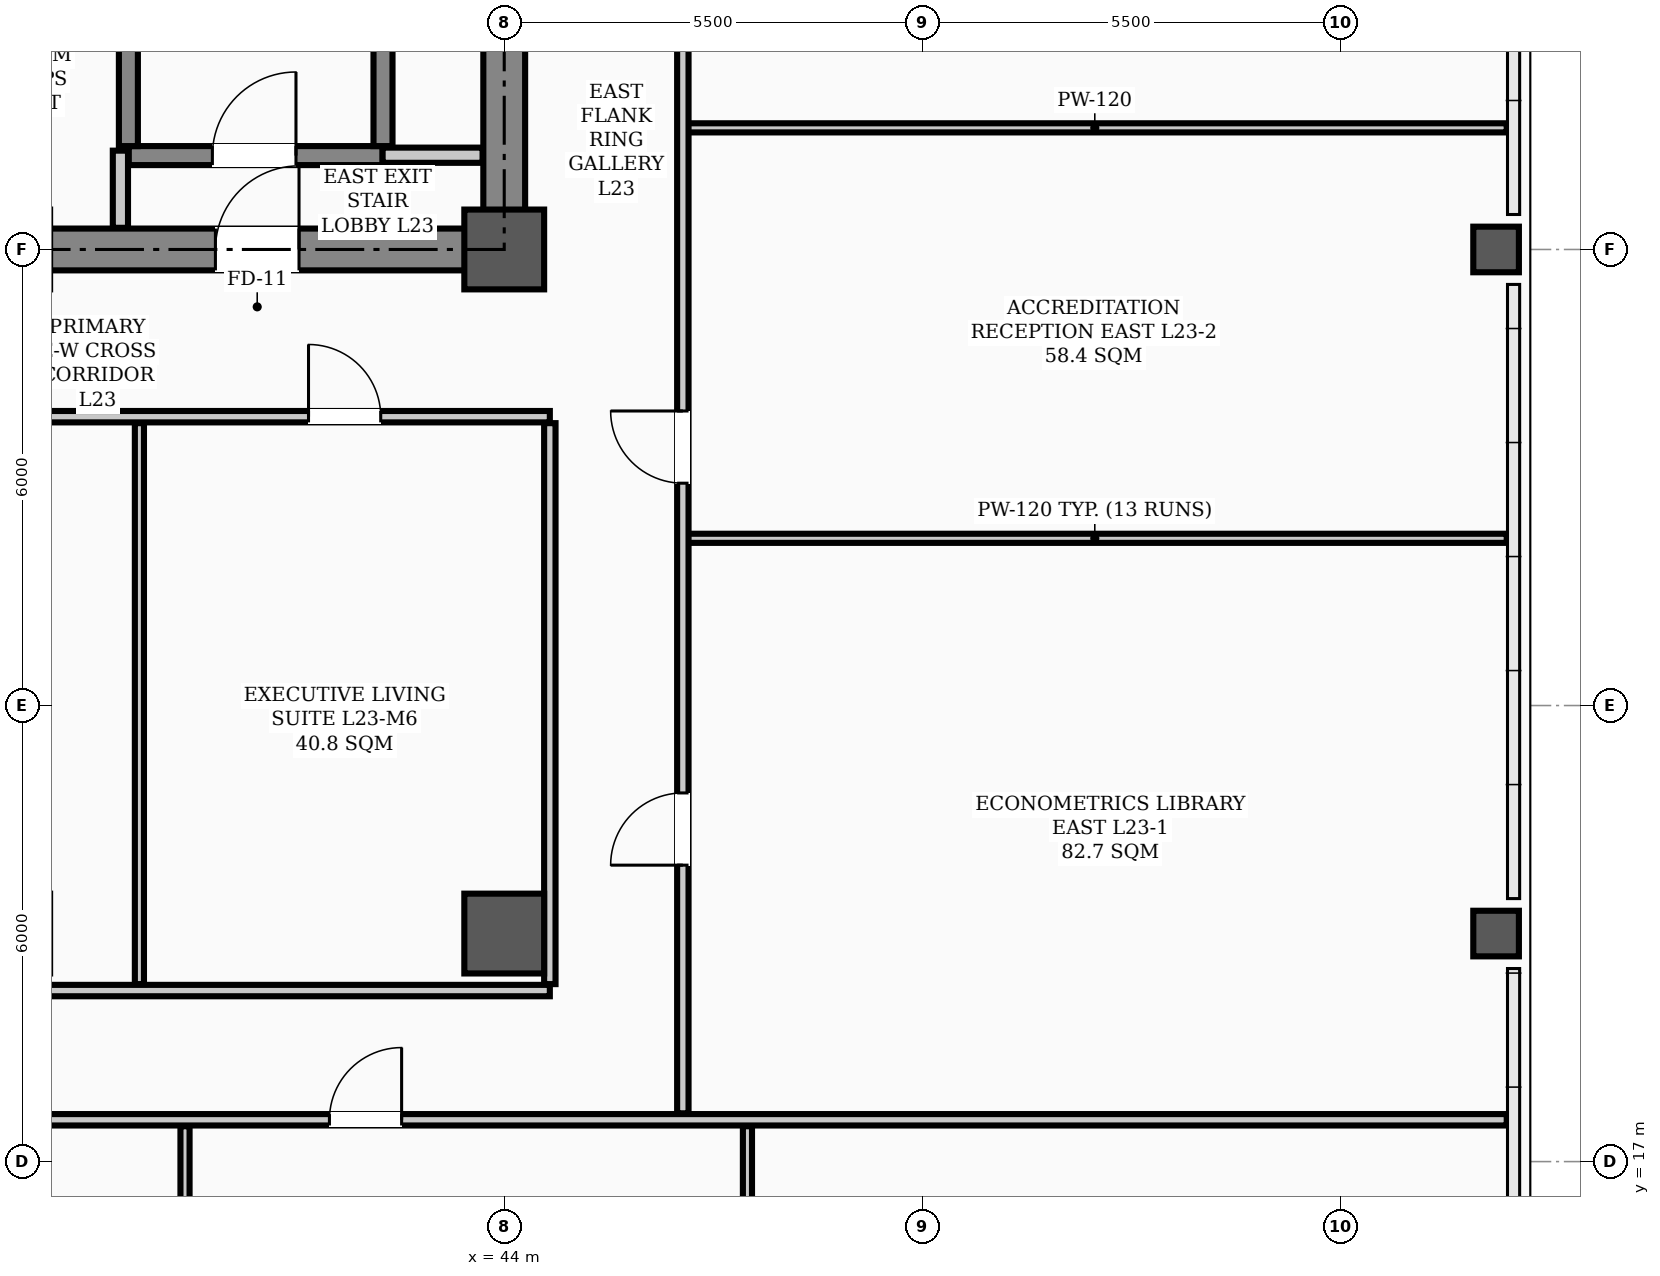
"""IFC4 building model, lengths in metres.
Left out: names, types, materials, properties, quantities, classifications, styles, units other than length and angle.
Written with IfcOpenShell. Run it as: python <this file> out.ifc"""

import sys

from ifc_helpers import new_model, si_unit, direction, frame, frame_2d, origin, origin_2d, place, context, subcontext, project, spatial, rectangle, hollow_rectangle, extrude, element, fill, save


model = new_model("IFC4")
c1 = context("Model", 3, precision=1e-05, world=origin(), true_north=direction((0.0, 1.0)))
c2 = subcontext(c1, "Body", "Model", "MODEL_VIEW")
j1 = project(units=[si_unit("LENGTHUNIT", "METRE"), si_unit("PLANEANGLEUNIT", "RADIAN")], contexts=[c1])
p1 = place(None, origin())
s1 = spatial("IfcSite", under=j1, at=p1, CompositionType="ELEMENT")
p2 = place(p1, origin())
s2 = spatial("IfcBuilding", under=s1, at=p2, CompositionType="ELEMENT")
p3 = place(p2, frame((0.0, 0.0, 92.8)))
s3 = spatial("IfcBuildingStorey", under=s2, at=p3, CompositionType="ELEMENT", Elevation=92.8)
for number, where, z_axis, x_axis in (
    (1, (44.0, 29.0, 0.0), (0.0, 0.0, 1.0), (1.0, 0.0, 0.0)),
    (2, (44.0, 20.0, 0.0), (0.0, 0.0, 1.0), (1.0, 0.0, 0.0)),
):
    element("IfcColumn", number, at=place(p3, frame(where, z_axis=z_axis, x_axis=x_axis)), inside=s3, PredefinedType="COLUMN", context=c2, shape_type="SweptSolid", body=[
        extrude(hollow_rectangle(XDim=1.05, YDim=1.05, WallThickness=0.038, InnerFilletRadius=0.019, OuterFilletRadius=0.057, at=origin_2d()), origin(), (0.0, 0.0, 1.0), 3.9),
    ])
for number, where, z_axis, x_axis in (
    (3, (57.05, 20.0, 0.0), (0.0, 0.0, 1.0), (1.0, 0.0, 0.0)),
    (4, (57.05, 29.0, 0.0), (0.0, 0.0, 1.0), (1.0, 0.0, 0.0)),
):
    element("IfcColumn", number, at=place(p3, frame(where, z_axis=z_axis, x_axis=x_axis)), inside=s3, PredefinedType="COLUMN", context=c2, shape_type="SweptSolid", body=[
        extrude(hollow_rectangle(XDim=0.6, YDim=0.6, WallThickness=0.026, InnerFilletRadius=0.013, OuterFilletRadius=0.039, at=origin_2d()), origin(), (0.0, 0.0, 1.0), 3.9),
    ])
p4 = place(p3, frame((13.5, 29.0, 0.0), z_axis=(0.0, 0.0, 1.0), x_axis=(1.0, 0.0, 0.0)))
e5 = element("IfcWall", 5, at=p4, inside=s3, PredefinedType="SHEAR", context=c2, shape_type="SweptSolid", body=[
    extrude(rectangle(XDim=30.5, YDim=0.55, at=frame_2d((15.25, 0.0))), origin(), (0.0, 0.0, 1.0), 3.72),
])
p5 = place(p4, frame((1.75, 0.0, 0.0)))
e6 = element("IfcOpeningElement", 6, at=p5, cuts=e5, PredefinedType="OPENING", context=c2, shape_type="SweptSolid", body=[
    extrude(rectangle(XDim=1.1, YDim=2.08, at=frame_2d((0.55, 1.04))), frame((0.0, 0.285, 0.0), z_axis=(0.0, -1.0, 0.0), x_axis=(1.0, 0.0, 0.0)), (0.0, 0.0, 1.0), 0.57),
])
p6 = place(p4, frame((26.7, 0.0, 0.0)))
e7 = element("IfcOpeningElement", 7, at=p6, cuts=e5, PredefinedType="OPENING", context=c2, shape_type="SweptSolid", body=[
    extrude(rectangle(XDim=1.1, YDim=2.08, at=frame_2d((0.55, 1.04))), frame((0.0, 0.285, 0.0), z_axis=(0.0, -1.0, 0.0), x_axis=(1.0, 0.0, 0.0)), (0.0, 0.0, 1.0), 0.57),
])
p7 = place(p4, frame((6.8, 0.0, 0.0)))
e8 = element("IfcOpeningElement", 8, at=p7, cuts=e5, PredefinedType="OPENING", context=c2, shape_type="SweptSolid", body=[
    extrude(rectangle(XDim=1.1, YDim=2.08, at=frame_2d((0.55, 1.04))), frame((0.0, 0.285, 0.0), z_axis=(0.0, -1.0, 0.0), x_axis=(1.0, 0.0, 0.0)), (0.0, 0.0, 1.0), 0.57),
])
p8 = place(p4, frame((13.2, 0.0, 0.0)))
e9 = element("IfcOpeningElement", 9, at=p8, cuts=e5, PredefinedType="OPENING", context=c2, shape_type="SweptSolid", body=[
    extrude(rectangle(XDim=1.6, YDim=2.08, at=frame_2d((0.8, 1.04))), frame((0.0, 0.285, 0.0), z_axis=(0.0, -1.0, 0.0), x_axis=(1.0, 0.0, 0.0)), (0.0, 0.0, 1.0), 0.57),
])
p9 = place(p4, frame((19.6, 0.0, 0.0)))
e10 = element("IfcOpeningElement", 10, at=p9, cuts=e5, PredefinedType="OPENING", context=c2, shape_type="SweptSolid", body=[
    extrude(rectangle(XDim=0.9, YDim=2.08, at=frame_2d((0.45, 1.04))), frame((0.0, 0.285, 0.0), z_axis=(0.0, -1.0, 0.0), x_axis=(1.0, 0.0, 0.0)), (0.0, 0.0, 1.0), 0.57),
])
p10 = place(p4, frame((21.6, 0.0, 0.0)))
e11 = element("IfcOpeningElement", 11, at=p10, cuts=e5, PredefinedType="OPENING", context=c2, shape_type="SweptSolid", body=[
    extrude(rectangle(XDim=0.9, YDim=2.08, at=frame_2d((0.45, 1.04))), frame((0.0, 0.285, 0.0), z_axis=(0.0, -1.0, 0.0), x_axis=(1.0, 0.0, 0.0)), (0.0, 0.0, 1.0), 0.57),
])
p11 = place(p3, frame((44.0, 29.35, 0.0), z_axis=(0.0, 0.0, 1.0), x_axis=(0.0, 1.0, 0.0)))
e12 = element("IfcWall", 12, at=p11, inside=s3, PredefinedType="SHEAR", context=c2, shape_type="SweptSolid", body=[
    extrude(rectangle(XDim=8.6, YDim=0.55, at=frame_2d((4.3, 0.0))), origin(), (0.0, 0.0, 1.0), 3.72),
])
p12 = place(p3, frame((39.06, 30.235, 0.0), z_axis=(0.0, 0.0, 1.0), x_axis=(1.0, 0.0, 0.0)))
e13 = element("IfcWall", 13, at=p12, inside=s3, PredefinedType="STANDARD", context=c2, shape_type="SweptSolid", body=[
    extrude(rectangle(XDim=3.34, YDim=0.25, at=frame_2d((1.67, 0.0))), origin(), (0.0, 0.0, 1.0), 3.72),
])
p13 = place(p12, frame((1.1, 0.0, 0.0)))
e14 = element("IfcOpeningElement", 14, at=p13, cuts=e13, PredefinedType="OPENING", context=c2, shape_type="SweptSolid", body=[
    extrude(rectangle(XDim=1.1, YDim=2.08, at=frame_2d((0.55, 1.04))), frame((0.0, 0.135, 0.0), z_axis=(0.0, -1.0, 0.0), x_axis=(1.0, 0.0, 0.0)), (0.0, 0.0, 1.0), 0.27),
])
for number, where, z_axis, x_axis in (
    (15, (39.055, 30.36, 0.0), (0.0, 0.0, 1.0), (0.0, 1.0, 0.0)),
    (16, (42.405, 30.36, 0.0), (0.0, 0.0, 1.0), (0.0, 1.0, 0.0)),
):
    element("IfcWall", number, at=place(p3, frame(where, z_axis=z_axis, x_axis=x_axis)), inside=s3, PredefinedType="STANDARD", context=c2, shape_type="SweptSolid", body=[
        extrude(rectangle(XDim=7.184, YDim=0.25, at=frame_2d((3.592, 0.0))), origin(), (0.0, 0.0, 1.0), 3.72),
    ])
p14 = place(p3, frame((42.4, 30.24, 0.0), z_axis=(0.0, 0.0, 1.0), x_axis=(1.0, 0.0, 0.0)))
e17 = element("IfcWall", 17, at=p14, inside=s3, PredefinedType="STANDARD", context=c2, shape_type="SweptSolid", body=[
    extrude(rectangle(XDim=1.315, YDim=0.2, at=frame_2d((0.658, 0.0))), origin(), (0.0, 0.0, 1.0), 3.1),
])
p15 = place(p3, frame((12.9, 26.8, 0.0), z_axis=(0.0, 0.0, 1.0), x_axis=(1.0, 0.0, 0.0)))
e18 = element("IfcWall", 18, at=p15, inside=s3, PredefinedType="PARTITIONING", context=c2, shape_type="SweptSolid", body=[
    extrude(rectangle(XDim=31.7, YDim=0.15, at=frame_2d((15.85, 0.0))), origin(), (0.0, 0.0, 1.0), 3.1),
])
p16 = place(p15, frame((13.6, 0.0, 0.0)))
e19 = element("IfcOpeningElement", 19, at=p16, cuts=e18, PredefinedType="OPENING", context=c2, shape_type="SweptSolid", body=[
    extrude(rectangle(XDim=1.6, YDim=2.08, at=frame_2d((0.8, 1.04))), frame((0.0, 0.085, 0.0), z_axis=(0.0, -1.0, 0.0), x_axis=(1.0, 0.0, 0.0)), (0.0, 0.0, 1.0), 0.17),
])
p17 = place(p15, frame((2.075, 0.0, 0.0)))
e20 = element("IfcOpeningElement", 20, at=p17, cuts=e18, PredefinedType="OPENING", context=c2, shape_type="SweptSolid", body=[
    extrude(rectangle(XDim=0.95, YDim=2.08, at=frame_2d((0.475, 1.04))), frame((0.0, 0.085, 0.0), z_axis=(0.0, -1.0, 0.0), x_axis=(1.0, 0.0, 0.0)), (0.0, 0.0, 1.0), 0.17),
])
p18 = place(p15, frame((6.925, 0.0, 0.0)))
e21 = element("IfcOpeningElement", 21, at=p18, cuts=e18, PredefinedType="OPENING", context=c2, shape_type="SweptSolid", body=[
    extrude(rectangle(XDim=0.95, YDim=2.08, at=frame_2d((0.475, 1.04))), frame((0.0, 0.085, 0.0), z_axis=(0.0, -1.0, 0.0), x_axis=(1.0, 0.0, 0.0)), (0.0, 0.0, 1.0), 0.17),
])
p19 = place(p15, frame((11.025, 0.0, 0.0)))
e22 = element("IfcOpeningElement", 22, at=p19, cuts=e18, PredefinedType="OPENING", context=c2, shape_type="SweptSolid", body=[
    extrude(rectangle(XDim=0.95, YDim=2.08, at=frame_2d((0.475, 1.04))), frame((0.0, 0.085, 0.0), z_axis=(0.0, -1.0, 0.0), x_axis=(1.0, 0.0, 0.0)), (0.0, 0.0, 1.0), 0.17),
])
p20 = place(p15, frame((16.075, 0.0, 0.0)))
e23 = element("IfcOpeningElement", 23, at=p20, cuts=e18, PredefinedType="OPENING", context=c2, shape_type="SweptSolid", body=[
    extrude(rectangle(XDim=0.95, YDim=2.08, at=frame_2d((0.475, 1.04))), frame((0.0, 0.085, 0.0), z_axis=(0.0, -1.0, 0.0), x_axis=(1.0, 0.0, 0.0)), (0.0, 0.0, 1.0), 0.17),
])
p21 = place(p15, frame((22.025, 0.0, 0.0)))
e24 = element("IfcOpeningElement", 24, at=p21, cuts=e18, PredefinedType="OPENING", context=c2, shape_type="SweptSolid", body=[
    extrude(rectangle(XDim=0.95, YDim=2.08, at=frame_2d((0.475, 1.04))), frame((0.0, 0.085, 0.0), z_axis=(0.0, -1.0, 0.0), x_axis=(1.0, 0.0, 0.0)), (0.0, 0.0, 1.0), 0.17),
])
p22 = place(p15, frame((28.525, 0.0, 0.0)))
e25 = element("IfcOpeningElement", 25, at=p22, cuts=e18, PredefinedType="OPENING", context=c2, shape_type="SweptSolid", body=[
    extrude(rectangle(XDim=0.95, YDim=2.08, at=frame_2d((0.475, 1.04))), frame((0.0, 0.085, 0.0), z_axis=(0.0, -1.0, 0.0), x_axis=(1.0, 0.0, 0.0)), (0.0, 0.0, 1.0), 0.17),
])
p23 = place(p3, frame((7.81, 17.55, 0.0), z_axis=(0.0, 0.0, 1.0), x_axis=(1.0, 0.0, 0.0)))
e26 = element("IfcWall", 26, at=p23, inside=s3, PredefinedType="PARTITIONING", context=c2, shape_type="SweptSolid", body=[
    extrude(rectangle(XDim=49.38, YDim=0.15, at=frame_2d((24.69, 0.0))), origin(), (0.0, 0.0, 1.0), 3.1),
])
p24 = place(p23, frame((3.59, 0.0, 0.0)))
e27 = element("IfcOpeningElement", 27, at=p24, cuts=e26, PredefinedType="OPENING", context=c2, shape_type="SweptSolid", body=[
    extrude(rectangle(XDim=0.95, YDim=2.08, at=frame_2d((0.475, 1.04))), frame((0.0, 0.085, 0.0), z_axis=(0.0, -1.0, 0.0), x_axis=(1.0, 0.0, 0.0)), (0.0, 0.0, 1.0), 0.17),
])
p25 = place(p23, frame((10.115, 0.0, 0.0)))
e28 = element("IfcOpeningElement", 28, at=p25, cuts=e26, PredefinedType="OPENING", context=c2, shape_type="SweptSolid", body=[
    extrude(rectangle(XDim=0.95, YDim=2.08, at=frame_2d((0.475, 1.04))), frame((0.0, 0.085, 0.0), z_axis=(0.0, -1.0, 0.0), x_axis=(1.0, 0.0, 0.0)), (0.0, 0.0, 1.0), 0.17),
])
p26 = place(p23, frame((18.615, 0.0, 0.0)))
e29 = element("IfcOpeningElement", 29, at=p26, cuts=e26, PredefinedType="OPENING", context=c2, shape_type="SweptSolid", body=[
    extrude(rectangle(XDim=0.95, YDim=2.08, at=frame_2d((0.475, 1.04))), frame((0.0, 0.085, 0.0), z_axis=(0.0, -1.0, 0.0), x_axis=(1.0, 0.0, 0.0)), (0.0, 0.0, 1.0), 0.17),
])
p27 = place(p23, frame((27.315, 0.0, 0.0)))
e30 = element("IfcOpeningElement", 30, at=p27, cuts=e26, PredefinedType="OPENING", context=c2, shape_type="SweptSolid", body=[
    extrude(rectangle(XDim=0.95, YDim=2.08, at=frame_2d((0.475, 1.04))), frame((0.0, 0.085, 0.0), z_axis=(0.0, -1.0, 0.0), x_axis=(1.0, 0.0, 0.0)), (0.0, 0.0, 1.0), 0.17),
])
p28 = place(p23, frame((33.89, 0.0, 0.0)))
e31 = element("IfcOpeningElement", 31, at=p28, cuts=e26, PredefinedType="OPENING", context=c2, shape_type="SweptSolid", body=[
    extrude(rectangle(XDim=0.95, YDim=2.08, at=frame_2d((0.475, 1.04))), frame((0.0, 0.085, 0.0), z_axis=(0.0, -1.0, 0.0), x_axis=(1.0, 0.0, 0.0)), (0.0, 0.0, 1.0), 0.17),
])
p29 = place(p3, frame((28.4, 19.25, 0.0), z_axis=(0.0, 0.0, 1.0), x_axis=(1.0, 0.0, 0.0)))
e32 = element("IfcWall", 32, at=p29, inside=s3, PredefinedType="PARTITIONING", context=c2, shape_type="SweptSolid", body=[
    extrude(rectangle(XDim=16.2, YDim=0.15, at=frame_2d((8.1, 0.0))), origin(), (0.0, 0.0, 1.0), 3.1),
])
for number, where, z_axis, x_axis in (
    (33, (46.35, 25.2, 0.0), (0.0, 0.0, 1.0), (1.0, 0.0, 0.0)),
    (34, (46.35, 30.6, 0.0), (0.0, 0.0, 1.0), (1.0, 0.0, 0.0)),
):
    element("IfcWall", number, at=place(p3, frame(where, z_axis=z_axis, x_axis=x_axis)), inside=s3, PredefinedType="PARTITIONING", context=c2, shape_type="SweptSolid", body=[
        extrude(rectangle(XDim=10.84, YDim=0.12, at=frame_2d((5.42, 0.0))), origin(), (0.0, 0.0, 1.0), 3.212),
    ])
p30 = place(p3, frame((38.95, 29.285, 0.0), z_axis=(0.0, 0.0, 1.0), x_axis=(0.0, 1.0, 0.0)))
e35 = element("IfcWall", 35, at=p30, inside=s3, PredefinedType="STANDARD", context=c2, shape_type="SweptSolid", body=[
    extrude(rectangle(XDim=1.015, YDim=0.2, at=frame_2d((0.508, 0.0))), origin(), (0.0, 0.0, 1.0), 3.3),
])
p31 = place(p3, frame((46.35, 17.635, 0.0), z_axis=(0.0, 0.0, 1.0), x_axis=(0.0, 1.0, 0.0)))
e36 = element("IfcWall", 36, at=p31, inside=s3, PredefinedType="PARTITIONING", context=c2, shape_type="SweptSolid", body=[
    extrude(rectangle(XDim=20.58, YDim=0.15, at=frame_2d((10.29, 0.0))), origin(), (0.0, 0.0, 1.0), 3.0),
])
p32 = place(p31, frame((3.265, 0.0, 0.0)))
e37 = element("IfcOpeningElement", 37, at=p32, cuts=e36, PredefinedType="OPENING", context=c2, shape_type="SweptSolid", body=[
    extrude(rectangle(XDim=0.95, YDim=2.08, at=frame_2d((0.475, 1.04))), frame((0.0, 0.085, 0.0), z_axis=(0.0, -1.0, 0.0), x_axis=(1.0, 0.0, 0.0)), (0.0, 0.0, 1.0), 0.17),
])
p33 = place(p31, frame((8.29, 0.0, 0.0)))
e38 = element("IfcOpeningElement", 38, at=p33, cuts=e36, PredefinedType="OPENING", context=c2, shape_type="SweptSolid", body=[
    extrude(rectangle(XDim=0.95, YDim=2.08, at=frame_2d((0.475, 1.04))), frame((0.0, 0.085, 0.0), z_axis=(0.0, -1.0, 0.0), x_axis=(1.0, 0.0, 0.0)), (0.0, 0.0, 1.0), 0.17),
])
p34 = place(p31, frame((16.34, 0.0, 0.0)))
e39 = element("IfcOpeningElement", 39, at=p34, cuts=e36, PredefinedType="OPENING", context=c2, shape_type="SweptSolid", body=[
    extrude(rectangle(XDim=0.95, YDim=2.08, at=frame_2d((0.475, 1.04))), frame((0.0, 0.085, 0.0), z_axis=(0.0, -1.0, 0.0), x_axis=(1.0, 0.0, 0.0)), (0.0, 0.0, 1.0), 0.17),
])
p35 = place(p3, frame((44.6, 19.335, 0.0), z_axis=(0.0, 0.0, 1.0), x_axis=(0.0, 1.0, 0.0)))
e40 = element("IfcWall", 40, at=p35, inside=s3, PredefinedType="PARTITIONING", context=c2, shape_type="SweptSolid", body=[
    extrude(rectangle(XDim=7.38, YDim=0.15, at=frame_2d((3.69, 0.0))), origin(), (0.0, 0.0, 1.0), 3.0),
])
p36 = place(p3, frame((39.8, 9.81, 0.0), z_axis=(0.0, 0.0, 1.0), x_axis=(0.0, 1.0, 0.0)))
e41 = element("IfcWall", 41, at=p36, inside=s3, PredefinedType="PARTITIONING", context=c2, shape_type="SweptSolid", body=[
    extrude(rectangle(XDim=7.655, YDim=0.12, at=frame_2d((3.828, 0.0))), origin(), (0.0, 0.0, 1.0), 3.212),
])
p37 = place(p3, frame((47.2, 9.81, 0.0), z_axis=(0.0, 0.0, 1.0), x_axis=(0.0, 1.0, 0.0)))
e42 = element("IfcWall", 42, at=p37, inside=s3, PredefinedType="PARTITIONING", context=c2, shape_type="SweptSolid", body=[
    extrude(rectangle(XDim=7.655, YDim=0.12, at=frame_2d((3.828, 0.0))), origin(), (0.0, 0.0, 1.0), 3.72),
])
p38 = place(p37, frame((3.395, 0.0, 0.0)))
e43 = element("IfcOpeningElement", 43, at=p38, cuts=e42, PredefinedType="OPENING", context=c2, shape_type="SweptSolid", body=[
    extrude(rectangle(XDim=0.95, YDim=2.08, at=frame_2d((0.475, 1.04))), frame((0.0, 0.07, 0.0), z_axis=(0.0, -1.0, 0.0), x_axis=(1.0, 0.0, 0.0)), (0.0, 0.0, 1.0), 0.14),
])
p39 = place(p3, frame((39.2, 19.335, 0.0), z_axis=(0.0, 0.0, 1.0), x_axis=(0.0, 1.0, 0.0)))
e44 = element("IfcWall", 44, at=p39, inside=s3, PredefinedType="PARTITIONING", context=c2, shape_type="SweptSolid", body=[
    extrude(rectangle(XDim=7.38, YDim=0.12, at=frame_2d((3.69, 0.0))), origin(), (0.0, 0.0, 1.0), 3.0),
])
p40 = place(p13, origin())
e45 = element("IfcDoor", 45, at=p40, inside=s3, OperationType="SINGLE_SWING_RIGHT", PredefinedType="DOOR", context=c2, shape_type="SweptSolid", body=[
    extrude(rectangle(XDim=1.1, YDim=2.08, at=frame_2d((0.55, 1.04))), frame((0.0, 0.025, 0.0), z_axis=(0.0, -1.0, 0.0), x_axis=(1.0, 0.0, 0.0)), (0.0, 0.0, 1.0), 0.05),
])
fill(e14, e45)
p41 = place(p6, origin())
e46 = element("IfcDoor", 46, at=p41, inside=s3, OperationType="SINGLE_SWING_RIGHT", PredefinedType="DOOR", context=c2, shape_type="SweptSolid", body=[
    extrude(rectangle(XDim=1.1, YDim=2.08, at=frame_2d((0.55, 1.04))), frame((0.0, 0.025, 0.0), z_axis=(0.0, -1.0, 0.0), x_axis=(1.0, 0.0, 0.0)), (0.0, 0.0, 1.0), 0.05),
])
fill(e7, e46)
p42 = place(p28, origin())
e47 = element("IfcDoor", 47, at=p42, inside=s3, OperationType="SINGLE_SWING_RIGHT", PredefinedType="DOOR", context=c2, shape_type="SweptSolid", body=[
    extrude(rectangle(XDim=0.95, YDim=2.08, at=frame_2d((0.475, 1.04))), frame((0.0, 0.025, 0.0), z_axis=(0.0, -1.0, 0.0), x_axis=(1.0, 0.0, 0.0)), (0.0, 0.0, 1.0), 0.05),
])
fill(e31, e47)
p43 = place(p22, origin())
e48 = element("IfcDoor", 48, at=p43, inside=s3, OperationType="SINGLE_SWING_LEFT", PredefinedType="DOOR", context=c2, shape_type="SweptSolid", body=[
    extrude(rectangle(XDim=0.95, YDim=2.08, at=frame_2d((0.475, 1.04))), frame((0.0, 0.025, 0.0), z_axis=(0.0, -1.0, 0.0), x_axis=(1.0, 0.0, 0.0)), (0.0, 0.0, 1.0), 0.05),
])
fill(e25, e48)
p44 = place(p32, origin())
e49 = element("IfcDoor", 49, at=p44, inside=s3, OperationType="SINGLE_SWING_LEFT", PredefinedType="DOOR", context=c2, shape_type="SweptSolid", body=[
    extrude(rectangle(XDim=0.95, YDim=2.08, at=frame_2d((0.475, 1.04))), frame((0.0, 0.025, 0.0), z_axis=(0.0, -1.0, 0.0), x_axis=(1.0, 0.0, 0.0)), (0.0, 0.0, 1.0), 0.05),
])
fill(e37, e49)
p45 = place(p33, origin())
e50 = element("IfcDoor", 50, at=p45, inside=s3, OperationType="SINGLE_SWING_RIGHT", PredefinedType="DOOR", context=c2, shape_type="SweptSolid", body=[
    extrude(rectangle(XDim=0.95, YDim=2.08, at=frame_2d((0.475, 1.04))), frame((0.0, 0.025, 0.0), z_axis=(0.0, -1.0, 0.0), x_axis=(1.0, 0.0, 0.0)), (0.0, 0.0, 1.0), 0.05),
])
fill(e38, e50)
save(model, sys.argv[1])
